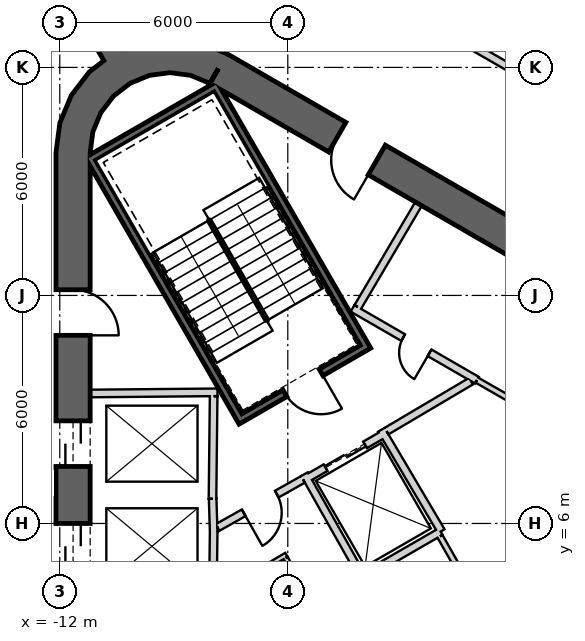
"""IFC4 building model, lengths in metres.
Left out: names, types, materials, properties, quantities, classifications, styles, units other than length and angle.
Written with IfcOpenShell. Run it as: python <this file> out.ifc"""

import sys

from ifc_helpers import new_model, si_unit, direction, frame, frame_2d, origin, place, context, subcontext, project, spatial, polyline, rectangle, outline, extrude, element, fill, save


model = new_model("IFC4")
c1 = context("Model", 3, precision=1e-05, world=origin(), true_north=direction((0.0, 1.0)))
c2 = subcontext(c1, "Body", "Model", "MODEL_VIEW")
j1 = project(units=[si_unit("LENGTHUNIT", "METRE"), si_unit("PLANEANGLEUNIT", "RADIAN")], contexts=[c1])
p1 = place(None, origin())
s1 = spatial("IfcSite", under=j1, at=p1, CompositionType="ELEMENT")
p2 = place(p1, origin())
s2 = spatial("IfcBuilding", under=s1, at=p2, CompositionType="ELEMENT")
p3 = place(p2, frame((0.0, 0.0, 333.8)))
s3 = spatial("IfcBuildingStorey", under=s2, at=p3, CompositionType="ELEMENT", Elevation=333.8)
p4 = place(p3, frame((19.475, 2.208, 0.0), z_axis=(0.0, 0.0, 1.0), x_axis=(-0.866028369851, 0.499994862586, 0.0)))
e1 = element("IfcWall", 1, at=p4, inside=s3, PredefinedType="SHEAR", context=c2, shape_type="SweptSolid", body=[
    extrude(rectangle(XDim=31.523, YDim=0.9, at=frame_2d((15.762, 0.0))), origin(), (0.0, 0.0, 1.0), 3.9),
])
p5 = place(p4, frame((7.062, 0.0, 0.0)))
e2 = element("IfcOpeningElement", 2, at=p5, cuts=e1, PredefinedType="OPENING", context=c2, shape_type="SweptSolid", body=[
    extrude(rectangle(XDim=1.2, YDim=2.4, at=frame_2d((0.6, 1.2))), frame((0.0, 0.46, 0.0), z_axis=(0.0, -1.0, 0.0), x_axis=(1.0, 0.0, 0.0)), (0.0, 0.0, 1.0), 0.92),
])
p6 = place(p4, frame((3.612, 0.0, 0.0)))
e3 = element("IfcOpeningElement", 3, at=p6, cuts=e1, PredefinedType="OPENING", context=c2, shape_type="SweptSolid", body=[
    extrude(rectangle(XDim=1.2, YDim=2.4, at=frame_2d((0.6, 1.2))), frame((0.0, 0.46, 0.0), z_axis=(0.0, -1.0, 0.0), x_axis=(1.0, 0.0, 0.0)), (0.0, 0.0, 1.0), 0.92),
])
p7 = place(p4, frame((26.712, 0.0, 0.0)))
e4 = element("IfcOpeningElement", 4, at=p7, cuts=e1, PredefinedType="OPENING", context=c2, shape_type="SweptSolid", body=[
    extrude(rectangle(XDim=1.2, YDim=2.4, at=frame_2d((0.6, 1.2))), frame((0.0, 0.46, 0.0), z_axis=(0.0, -1.0, 0.0), x_axis=(1.0, 0.0, 0.0)), (0.0, 0.0, 1.0), 0.92),
])
p8 = place(p3, frame((-11.65, 15.762, 0.0), z_axis=(0.0, 0.0, 1.0), x_axis=(0.0, -1.0, 0.0)))
e5 = element("IfcWall", 5, at=p8, inside=s3, PredefinedType="SHEAR", context=c2, shape_type="SweptSolid", body=[
    extrude(rectangle(XDim=31.523, YDim=0.9, at=frame_2d((15.762, 0.0))), origin(), (0.0, 0.0, 1.0), 3.9),
])
p9 = place(p8, frame((7.062, 0.0, 0.0)))
e6 = element("IfcOpeningElement", 6, at=p9, cuts=e5, PredefinedType="OPENING", context=c2, shape_type="SweptSolid", body=[
    extrude(rectangle(XDim=1.2, YDim=2.4, at=frame_2d((0.6, 1.2))), frame((0.0, 0.46, 0.0), z_axis=(0.0, -1.0, 0.0), x_axis=(1.0, 0.0, 0.0)), (0.0, 0.0, 1.0), 0.92),
])
p10 = place(p8, frame((9.762, 0.0, 0.0)))
e7 = element("IfcOpeningElement", 7, at=p10, cuts=e5, PredefinedType="OPENING", context=c2, shape_type="SweptSolid", body=[
    extrude(rectangle(XDim=1.2, YDim=2.4, at=frame_2d((0.6, 1.2))), frame((0.0, 0.46, 0.0), z_axis=(0.0, -1.0, 0.0), x_axis=(1.0, 0.0, 0.0)), (0.0, 0.0, 1.0), 0.92),
])
p11 = place(p8, frame((12.462, 0.0, 0.0)))
e8 = element("IfcOpeningElement", 8, at=p11, cuts=e5, PredefinedType="OPENING", context=c2, shape_type="SweptSolid", body=[
    extrude(rectangle(XDim=1.2, YDim=2.4, at=frame_2d((0.6, 1.2))), frame((0.0, 0.46, 0.0), z_axis=(0.0, -1.0, 0.0), x_axis=(1.0, 0.0, 0.0)), (0.0, 0.0, 1.0), 0.92),
])
p12 = place(p8, frame((15.162, 0.0, 0.0)))
e9 = element("IfcOpeningElement", 9, at=p12, cuts=e5, PredefinedType="OPENING", context=c2, shape_type="SweptSolid", body=[
    extrude(rectangle(XDim=1.2, YDim=2.4, at=frame_2d((0.6, 1.2))), frame((0.0, 0.46, 0.0), z_axis=(0.0, -1.0, 0.0), x_axis=(1.0, 0.0, 0.0)), (0.0, 0.0, 1.0), 0.92),
])
p13 = place(p8, frame((17.862, 0.0, 0.0)))
e10 = element("IfcOpeningElement", 10, at=p13, cuts=e5, PredefinedType="OPENING", context=c2, shape_type="SweptSolid", body=[
    extrude(rectangle(XDim=1.2, YDim=2.4, at=frame_2d((0.6, 1.2))), frame((0.0, 0.46, 0.0), z_axis=(0.0, -1.0, 0.0), x_axis=(1.0, 0.0, 0.0)), (0.0, 0.0, 1.0), 0.92),
])
p14 = place(p8, frame((20.562, 0.0, 0.0)))
e11 = element("IfcOpeningElement", 11, at=p14, cuts=e5, PredefinedType="OPENING", context=c2, shape_type="SweptSolid", body=[
    extrude(rectangle(XDim=1.2, YDim=2.4, at=frame_2d((0.6, 1.2))), frame((0.0, 0.46, 0.0), z_axis=(0.0, -1.0, 0.0), x_axis=(1.0, 0.0, 0.0)), (0.0, 0.0, 1.0), 0.92),
])
p15 = place(p8, frame((23.262, 0.0, 0.0)))
e12 = element("IfcOpeningElement", 12, at=p15, cuts=e5, PredefinedType="OPENING", context=c2, shape_type="SweptSolid", body=[
    extrude(rectangle(XDim=1.2, YDim=2.4, at=frame_2d((0.6, 1.2))), frame((0.0, 0.46, 0.0), z_axis=(0.0, -1.0, 0.0), x_axis=(1.0, 0.0, 0.0)), (0.0, 0.0, 1.0), 0.92),
])
p16 = place(p8, frame((3.612, 0.0, 0.0)))
e13 = element("IfcOpeningElement", 13, at=p16, cuts=e5, PredefinedType="OPENING", context=c2, shape_type="SweptSolid", body=[
    extrude(rectangle(XDim=1.2, YDim=2.4, at=frame_2d((0.6, 1.2))), frame((0.0, 0.46, 0.0), z_axis=(0.0, -1.0, 0.0), x_axis=(1.0, 0.0, 0.0)), (0.0, 0.0, 1.0), 0.92),
])
p17 = place(p8, frame((26.712, 0.0, 0.0)))
e14 = element("IfcOpeningElement", 14, at=p17, cuts=e5, PredefinedType="OPENING", context=c2, shape_type="SweptSolid", body=[
    extrude(rectangle(XDim=1.2, YDim=2.4, at=frame_2d((0.6, 1.2))), frame((0.0, 0.46, 0.0), z_axis=(0.0, -1.0, 0.0), x_axis=(1.0, 0.0, 0.0)), (0.0, 0.0, 1.0), 0.92),
])
p18 = place(p3, origin())
e15 = element("IfcWall", 15, at=p18, inside=s3, PredefinedType="SHEAR", context=c2, shape_type="SweptSolid", body=[
    extrude(outline(polyline([(-7.6, 18.36), (-8.323, 18.659), (-9.1, 18.762), (-9.876, 18.659), (-10.6, 18.36), (-11.221, 17.883), (-11.698, 17.262), (-11.998, 16.538), (-12.1, 15.762), (-11.2, 15.762), (-11.128, 16.305), (-10.919, 16.812), (-10.585, 17.247), (-10.15, 17.58), (-9.644, 17.79), (-9.1, 17.862), (-8.556, 17.79), (-8.05, 17.58), (-7.6, 18.36)])), origin(), (0.0, 0.0, 1.0), 3.9),
])
p19 = place(p3, frame((-10.575, 18.316, 0.0), z_axis=(0.0, 0.0, 1.0), x_axis=(-0.499998447599, 0.866026300061, 0.0)))
e16 = element("IfcWall", 16, at=p19, inside=s3, PredefinedType="SHEAR", context=c2, shape_type="SweptSolid", body=[
    extrude(rectangle(XDim=8.321, YDim=0.6, at=frame_2d((4.16, 0.0))), origin(), (0.0, 0.0, 1.0), 3.9),
])
p20 = place(p19, frame((1.4, 0.0, 0.0)))
e17 = element("IfcOpeningElement", 17, at=p20, cuts=e16, PredefinedType="OPENING", context=c2, shape_type="SweptSolid", body=[
    extrude(rectangle(XDim=1.4, YDim=2.4, at=frame_2d((0.7, 1.2))), frame((0.0, 0.31, 0.0), z_axis=(0.0, -1.0, 0.0), x_axis=(1.0, 0.0, 0.0)), (0.0, 0.0, 1.0), 0.62),
])
p21 = place(p3, frame((-11.2, 9.42, 0.0), z_axis=(0.0, 0.0, 1.0), x_axis=(0.999957167047, 0.009255488683, 0.0)))
e18 = element("IfcWall", 18, at=p21, inside=s3, PredefinedType="PLUMBINGWALL", context=c2, shape_type="SweptSolid", body=[
    extrude(rectangle(XDim=3.35, YDim=0.2, at=frame_2d((1.675, 0.0))), origin(), (0.0, 0.0, 1.0), 3.6),
])
p22 = place(p3, frame((-7.951, 9.35, 0.0), z_axis=(0.0, 0.0, 1.0), x_axis=(-0.011120469654, -0.999938165666, 0.0)))
e19 = element("IfcWall", 19, at=p22, inside=s3, PredefinedType="PLUMBINGWALL", context=c2, shape_type="SweptSolid", body=[
    extrude(rectangle(XDim=2.7, YDim=0.2, at=frame_2d((1.35, 0.0))), origin(), (0.0, 0.0, 1.0), 3.6),
])
p23 = place(p3, frame((-7.977, 6.65, 0.0), z_axis=(0.0, 0.0, 1.0), x_axis=(0.030861509705, -0.999523670164, 0.0)))
e20 = element("IfcWall", 20, at=p23, inside=s3, PredefinedType="PLUMBINGWALL", context=c2, shape_type="SweptSolid", body=[
    extrude(rectangle(XDim=0.878, YDim=0.2, at=frame_2d((0.439, 0.0))), origin(), (0.0, 0.0, 1.0), 3.6),
])
p24 = place(p3, frame((-7.949, 5.895, 0.0), z_axis=(0.0, 0.0, 1.0), x_axis=(-0.012042535896, -0.999927486035, 0.0)))
e21 = element("IfcWall", 21, at=p24, inside=s3, PredefinedType="PLUMBINGWALL", context=c2, shape_type="SweptSolid", body=[
    extrude(rectangle(XDim=1.845, YDim=0.2, at=frame_2d((0.922, 0.0))), origin(), (0.0, 0.0, 1.0), 3.6),
])
p25 = place(p3, frame((-11.245, 15.678, -0.3), z_axis=(0.0, 0.0, 1.0), x_axis=(0.499977274689, -0.866038523851, 0.0)))
e22 = element("IfcWall", 22, at=p25, inside=s3, PredefinedType="SHEAR", context=c2, shape_type="SweptSolid", body=[
    extrude(rectangle(XDim=8.1, YDim=0.2, at=frame_2d((4.05, 0.0))), origin(), (0.0, 0.0, 1.0), 3.9),
])
p26 = place(p3, frame((-7.818, 17.541, -0.3), z_axis=(0.0, 0.0, 1.0), x_axis=(-0.866044365799, -0.499967155389, 0.0)))
e23 = element("IfcWall", 23, at=p26, inside=s3, PredefinedType="SHEAR", context=c2, shape_type="SweptSolid", body=[
    extrude(rectangle(XDim=3.8, YDim=0.2, at=frame_2d((1.9, 0.0))), origin(), (0.0, 0.0, 1.0), 3.9),
])
p27 = place(p3, frame((-7.854, 17.405, -0.3), z_axis=(0.0, 0.0, 1.0), x_axis=(0.499997992926, -0.866026562566, 0.0)))
e24 = element("IfcWall", 24, at=p27, inside=s3, PredefinedType="SHEAR", context=c2, shape_type="SweptSolid", body=[
    extrude(rectangle(XDim=7.9, YDim=0.2, at=frame_2d((3.95, 0.0))), origin(), (0.0, 0.0, 1.0), 3.9),
])
p28 = place(p3, frame((-7.159, 8.8, -0.3), z_axis=(0.0, 0.0, 1.0), x_axis=(0.866047807691, 0.499961193289, 0.0)))
e25 = element("IfcWall", 25, at=p28, inside=s3, PredefinedType="SHEAR", context=c2, shape_type="SweptSolid", body=[
    extrude(rectangle(XDim=3.6, YDim=0.2, at=frame_2d((1.8, 0.0))), origin(), (0.0, 0.0, 1.0), 3.9),
])
p29 = place(p28, frame((1.25, 0.0, 0.3)))
e26 = element("IfcOpeningElement", 26, at=p29, cuts=e25, PredefinedType="OPENING", context=c2, shape_type="SweptSolid", body=[
    extrude(rectangle(XDim=1.1, YDim=2.1, at=frame_2d((0.55, 1.05))), frame((0.0, 0.11, 0.0), z_axis=(0.0, -1.0, 0.0), x_axis=(1.0, 0.0, 0.0)), (0.0, 0.0, 1.0), 0.22),
])
p30 = place(p3, frame((-5.524, 7.168, 0.0), z_axis=(0.0, 0.0, 1.0), x_axis=(0.866024647952, 0.500001309137, 0.0)))
e27 = element("IfcWall", 27, at=p30, inside=s3, PredefinedType="PLUMBINGWALL", context=c2, shape_type="SweptSolid", body=[
    extrude(rectangle(XDim=2.4, YDim=0.2, at=frame_2d((1.2, 0.0))), origin(), (0.0, 0.0, 1.0), 3.6),
])
p31 = place(p30, frame((0.6, 0.0, 0.0)))
e28 = element("IfcOpeningElement", 28, at=p31, cuts=e27, PredefinedType="OPENING", context=c2, shape_type="SweptSolid", body=[
    extrude(rectangle(XDim=1.2, YDim=2.4, at=frame_2d((0.6, 1.2))), frame((0.0, 0.11, 0.0), z_axis=(0.0, -1.0, 0.0), x_axis=(1.0, 0.0, 0.0)), (0.0, 0.0, 1.0), 0.22),
])
p32 = place(p3, frame((-3.538, 8.465, 0.0), z_axis=(0.0, 0.0, 1.0), x_axis=(0.508647062354, -0.860975125052, 0.0)))
e29 = element("IfcWall", 29, at=p32, inside=s3, PredefinedType="PLUMBINGWALL", context=c2, shape_type="SweptSolid", body=[
    extrude(rectangle(XDim=3.1, YDim=0.2, at=frame_2d((1.55, 0.0))), origin(), (0.0, 0.0, 1.0), 3.6),
])
p33 = place(p3, frame((-1.979, 5.786, 0.0), z_axis=(0.0, 0.0, 1.0), x_axis=(-0.866016689309, -0.500015093611, 0.0)))
e30 = element("IfcWall", 30, at=p33, inside=s3, PredefinedType="PLUMBINGWALL", context=c2, shape_type="SweptSolid", body=[
    extrude(rectangle(XDim=2.479, YDim=0.2, at=frame_2d((1.24, 0.0))), origin(), (0.0, 0.0, 1.0), 3.6),
])
p34 = place(p3, frame((-5.562, 7.296, 0.0), z_axis=(0.0, 0.0, 1.0), x_axis=(0.49134651263, -0.870964180966, 0.0)))
e31 = element("IfcWall", 31, at=p34, inside=s3, PredefinedType="PLUMBINGWALL", context=c2, shape_type="SweptSolid", body=[
    extrude(rectangle(XDim=3.0, YDim=0.2, at=frame_2d((1.5, 0.0))), origin(), (0.0, 0.0, 1.0), 3.6),
])
p35 = place(p3, frame((7.497, 4.886, 0.0), z_axis=(0.0, 0.0, 1.0), x_axis=(-0.867541725638, 0.497364407931, 0.0)))
e32 = element("IfcWall", 32, at=p35, inside=s3, PredefinedType="PLUMBINGWALL", context=c2, shape_type="SweptSolid", body=[
    extrude(rectangle(XDim=9.822, YDim=0.15, at=frame_2d((4.911, 0.0))), origin(), (0.0, 0.0, 1.0), 3.6),
])
p36 = place(p35, frame((2.3, 0.0, 0.0)))
e33 = element("IfcOpeningElement", 33, at=p36, cuts=e32, PredefinedType="OPENING", context=c2, shape_type="SweptSolid", body=[
    extrude(rectangle(XDim=0.8, YDim=2.1, at=frame_2d((0.4, 1.05))), frame((0.0, 0.085, 0.0), z_axis=(0.0, -1.0, 0.0), x_axis=(1.0, 0.0, 0.0)), (0.0, 0.0, 1.0), 0.17),
])
p37 = place(p3, frame((-4.296, 11.66, 0.0), z_axis=(0.0, 0.0, 1.0), x_axis=(0.866027389382, -0.499996560828, 0.0)))
e34 = element("IfcWall", 34, at=p37, inside=s3, PredefinedType="PARTITIONING", context=c2, shape_type="SweptSolid", body=[
    extrude(rectangle(XDim=3.778, YDim=0.2, at=frame_2d((1.889, 0.0))), origin(), (0.0, 0.0, 1.0), 3.6),
])
p38 = place(p37, frame((1.539, 0.0, 0.0)))
e35 = element("IfcOpeningElement", 35, at=p38, cuts=e34, PredefinedType="OPENING", context=c2, shape_type="SweptSolid", body=[
    extrude(rectangle(XDim=0.8, YDim=2.1, at=frame_2d((0.4, 1.05))), frame((0.0, 0.11, 0.0), z_axis=(0.0, -1.0, 0.0), x_axis=(1.0, 0.0, 0.0)), (0.0, 0.0, 1.0), 0.22),
])
p39 = place(p3, frame((-2.558, 14.409, 0.0), z_axis=(0.0, 0.0, 1.0), x_axis=(-0.508018930956, -0.861345903683, 0.0)))
e36 = element("IfcWall", 36, at=p39, inside=s3, PredefinedType="PARTITIONING", context=c2, shape_type="SweptSolid", body=[
    extrude(rectangle(XDim=3.15, YDim=0.2, at=frame_2d((1.575, 0.0))), origin(), (0.0, 0.0, 1.0), 3.6),
])
p40 = place(p3, frame((-1.179, 9.745, 0.0), z_axis=(0.0, 0.0, 1.0), x_axis=(-0.860630814782, -0.509229418482, 0.0)))
e37 = element("IfcWall", 37, at=p40, inside=s3, PredefinedType="PARTITIONING", context=c2, shape_type="SweptSolid", body=[
    extrude(rectangle(XDim=2.582, YDim=0.2, at=frame_2d((1.291, 0.0))), origin(), (0.0, 0.0, 1.0), 3.6),
])
p41 = place(p3, frame((-5.6, 7.16, 0.0), z_axis=(0.0, 0.0, 1.0), x_axis=(-0.871363259478, -0.490638431059, 0.0)))
e38 = element("IfcWall", 38, at=p41, inside=s3, PredefinedType="PARTITIONING", context=c2, shape_type="SweptSolid", body=[
    extrude(rectangle(XDim=2.581, YDim=0.2, at=frame_2d((1.291, 0.0))), origin(), (0.0, 0.0, 1.0), 3.6),
])
p42 = place(p41, frame((0.791, 0.0, 0.0)))
e39 = element("IfcOpeningElement", 39, at=p42, cuts=e38, PredefinedType="OPENING", context=c2, shape_type="SweptSolid", body=[
    extrude(rectangle(XDim=1.0, YDim=2.1, at=frame_2d((0.5, 1.05))), frame((0.0, 0.11, 0.0), z_axis=(0.0, -1.0, 0.0), x_axis=(1.0, 0.0, 0.0)), (0.0, 0.0, 1.0), 0.22),
])
p43 = place(p3, frame((-1.994, 5.661, 0.0), z_axis=(0.0, 0.0, 1.0), x_axis=(0.493780191404, -0.869586753911, 0.0)))
e40 = element("IfcWall", 40, at=p43, inside=s3, PredefinedType="PLUMBINGWALL", context=c2, shape_type="SweptSolid", body=[
    extrude(rectangle(XDim=3.971, YDim=0.15, at=frame_2d((1.986, 0.0))), origin(), (0.0, 0.0, 1.0), 3.6),
])
p44 = place(p3, frame((-6.037, 5.176, 0.0), z_axis=(0.0, 0.0, 1.0), x_axis=(-0.860106072674, -0.510115225953, 0.0)))
e41 = element("IfcWall", 41, at=p44, inside=s3, PredefinedType="PARTITIONING", context=c2, shape_type="SweptSolid", body=[
    extrude(rectangle(XDim=2.225, YDim=0.12, at=frame_2d((1.112, 0.0))), origin(), (0.0, 0.0, 1.0), 3.6),
])
p45 = place(p3, frame((-4.279, 2.011, 0.0), z_axis=(0.0, 0.0, 1.0), x_axis=(-0.500027278734, 0.866009653827, 0.0)))
e42 = element("IfcWall", 42, at=p45, inside=s3, PredefinedType="PARTITIONING", context=c2, shape_type="SweptSolid", body=[
    extrude(rectangle(XDim=3.559, YDim=0.12, at=frame_2d((1.779, 0.0))), origin(), (0.0, 0.0, 1.0), 3.6),
])
p46 = place(p3, frame((16.523, 8.358, 0.0), z_axis=(0.0, 0.0, 1.0), x_axis=(-0.866025545866, 0.499999753908, 0.0)))
e43 = element("IfcWall", 43, at=p46, inside=s3, PredefinedType="PARTITIONING", context=c2, shape_type="SweptSolid", body=[
    extrude(rectangle(XDim=26.471, YDim=0.2, at=frame_2d((13.235, 0.0))), origin(), (0.0, 0.0, 1.0), 2.97),
])
p47 = place(p46, frame((21.568, 0.0, 0.0)))
e44 = element("IfcOpeningElement", 44, at=p47, cuts=e43, PredefinedType="OPENING", context=c2, shape_type="SweptSolid", body=[
    extrude(rectangle(XDim=1.0, YDim=2.1, at=frame_2d((0.5, 1.05))), frame((0.0, 0.11, 0.0), z_axis=(0.0, -1.0, 0.0), x_axis=(1.0, 0.0, 0.0)), (0.0, 0.0, 1.0), 0.22),
])
p48 = place(p46, frame((8.333, 0.0, 0.0)))
e45 = element("IfcOpeningElement", 45, at=p48, cuts=e43, PredefinedType="OPENING", context=c2, shape_type="SweptSolid", body=[
    extrude(rectangle(XDim=1.0, YDim=2.1, at=frame_2d((0.5, 1.05))), frame((0.0, 0.11, 0.0), z_axis=(0.0, -1.0, 0.0), x_axis=(1.0, 0.0, 0.0)), (0.0, 0.0, 1.0), 0.22),
])
p49 = place(p29, origin())
e46 = element("IfcDoor", 46, at=p49, inside=s3, OperationType="SINGLE_SWING_LEFT", PredefinedType="USERDEFINED", context=c2, shape_type="SweptSolid", body=[
    extrude(rectangle(XDim=1.1, YDim=2.1, at=frame_2d((0.55, 1.05))), frame((0.0, 0.025, 0.0), z_axis=(0.0, -1.0, 0.0), x_axis=(1.0, 0.0, 0.0)), (0.0, 0.0, 1.0), 0.05),
])
fill(e26, e46)
p50 = place(p42, origin())
e47 = element("IfcDoor", 47, at=p50, inside=s3, OperationType="SINGLE_SWING_RIGHT", PredefinedType="USERDEFINED", context=c2, shape_type="SweptSolid", body=[
    extrude(rectangle(XDim=1.0, YDim=2.1, at=frame_2d((0.5, 1.05))), frame((0.0, 0.025, 0.0), z_axis=(0.0, -1.0, 0.0), x_axis=(1.0, 0.0, 0.0)), (0.0, 0.0, 1.0), 0.05),
])
fill(e39, e47)
p51 = place(p31, origin())
e48 = element("IfcDoor", 48, at=p51, inside=s3, OperationType="SLIDING_TO_LEFT", PredefinedType="USERDEFINED", context=c2, shape_type="SweptSolid", body=[
    extrude(rectangle(XDim=1.2, YDim=2.4, at=frame_2d((0.6, 1.2))), frame((0.0, 0.025, 0.0), z_axis=(0.0, -1.0, 0.0), x_axis=(1.0, 0.0, 0.0)), (0.0, 0.0, 1.0), 0.05),
])
fill(e28, e48)
p52 = place(p38, origin())
e49 = element("IfcDoor", 49, at=p52, inside=s3, OperationType="SINGLE_SWING_LEFT", PredefinedType="USERDEFINED", context=c2, shape_type="SweptSolid", body=[
    extrude(rectangle(XDim=0.8, YDim=2.1, at=frame_2d((0.4, 1.05))), frame((0.0, 0.025, 0.0), z_axis=(0.0, -1.0, 0.0), x_axis=(1.0, 0.0, 0.0)), (0.0, 0.0, 1.0), 0.05),
])
fill(e35, e49)
p53 = place(p9, origin())
e50 = element("IfcDoor", 50, at=p53, inside=s3, OperationType="SLIDING_TO_LEFT", PredefinedType="USERDEFINED", context=c2, shape_type="SweptSolid", body=[
    extrude(rectangle(XDim=1.2, YDim=2.4, at=frame_2d((0.6, 1.2))), frame((0.0, 0.025, 0.0), z_axis=(0.0, -1.0, 0.0), x_axis=(1.0, 0.0, 0.0)), (0.0, 0.0, 1.0), 0.05),
])
fill(e6, e50)
p54 = place(p10, origin())
e51 = element("IfcDoor", 51, at=p54, inside=s3, OperationType="SLIDING_TO_LEFT", PredefinedType="USERDEFINED", context=c2, shape_type="SweptSolid", body=[
    extrude(rectangle(XDim=1.2, YDim=2.4, at=frame_2d((0.6, 1.2))), frame((0.0, 0.025, 0.0), z_axis=(0.0, -1.0, 0.0), x_axis=(1.0, 0.0, 0.0)), (0.0, 0.0, 1.0), 0.05),
])
fill(e7, e51)
p55 = place(p7, origin())
e52 = element("IfcDoor", 52, at=p55, inside=s3, OperationType="SINGLE_SWING_RIGHT", PredefinedType="USERDEFINED", context=c2, shape_type="SweptSolid", body=[
    extrude(rectangle(XDim=1.2, YDim=2.4, at=frame_2d((0.6, 1.2))), frame((0.0, 0.025, 0.0), z_axis=(0.0, -1.0, 0.0), x_axis=(1.0, 0.0, 0.0)), (0.0, 0.0, 1.0), 0.05),
])
fill(e4, e52)
p56 = place(p16, origin())
e53 = element("IfcDoor", 53, at=p56, inside=s3, OperationType="SINGLE_SWING_LEFT", PredefinedType="USERDEFINED", context=c2, shape_type="SweptSolid", body=[
    extrude(rectangle(XDim=1.2, YDim=2.4, at=frame_2d((0.6, 1.2))), frame((0.0, 0.025, 0.0), z_axis=(0.0, -1.0, 0.0), x_axis=(1.0, 0.0, 0.0)), (0.0, 0.0, 1.0), 0.05),
])
fill(e13, e53)
save(model, sys.argv[1])
